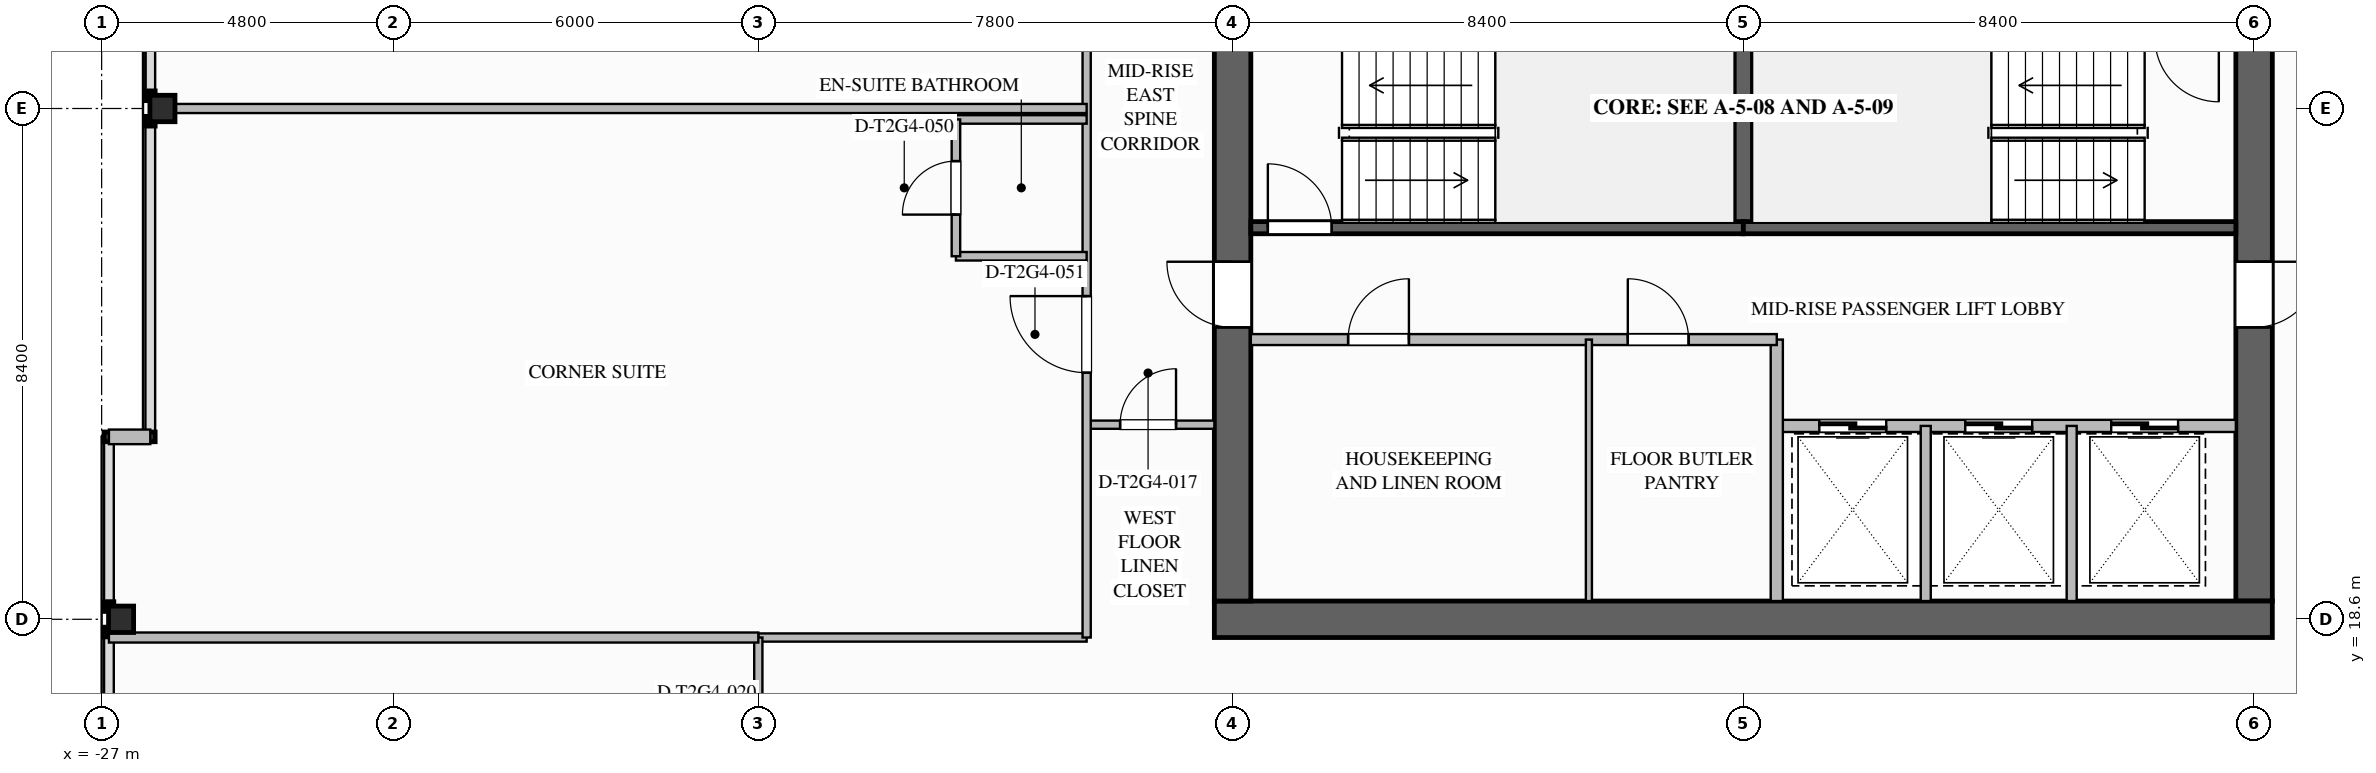
"""IFC4 building model, lengths in metres.
Left out: names, types, materials, properties, quantities, classifications, styles, units other than length and angle.
Written with IfcOpenShell. Run it as: python <this file> out.ifc"""

import sys

from ifc_helpers import new_model, si_unit, direction, frame, frame_2d, origin, origin_2d, place, context, subcontext, project, spatial, rectangle, i_section, extrude, element, fill, save


model = new_model("IFC4")
c1 = context("Model", 3, precision=1e-05, world=origin(), true_north=direction((0.0, 1.0)))
c2 = subcontext(c1, "Body", "Model", "MODEL_VIEW")
j1 = project(units=[si_unit("LENGTHUNIT", "METRE"), si_unit("PLANEANGLEUNIT", "RADIAN")], contexts=[c1])
p1 = place(None, origin())
s1 = spatial("IfcSite", under=j1, at=p1, CompositionType="ELEMENT")
p2 = place(p1, origin())
s2 = spatial("IfcBuilding", under=s1, at=p2, CompositionType="ELEMENT")
p3 = place(p2, frame((0.0, 0.0, 123.3)))
s3 = spatial("IfcBuildingStorey", under=s2, at=p3, CompositionType="ELEMENT", Elevation=123.3)
p4 = place(p3, frame((8.4, 35.1, 0.0), z_axis=(0.0, 0.0, 1.0), x_axis=(0.0, -1.0, 0.0)))
e1 = element("IfcWall", 1, at=p4, inside=s3, PredefinedType="SHEAR", context=c2, shape_type="SweptSolid", body=[
    extrude(rectangle(XDim=16.2, YDim=0.6, at=frame_2d((8.1, 0.0))), origin(), (0.0, 0.0, 1.0), 3.5),
])
p5 = place(p4, frame((3.08, 0.0, 0.0)))
e2 = element("IfcOpeningElement", 2, at=p5, cuts=e1, PredefinedType="OPENING", context=c2, shape_type="SweptSolid", body=[
    extrude(rectangle(XDim=1.12, YDim=2.1, at=frame_2d((0.56, 1.05))), frame((0.0, 0.31, 0.0), z_axis=(0.0, -1.0, 0.0), x_axis=(1.0, 0.0, 0.0)), (0.0, 0.0, 1.0), 0.62),
])
p6 = place(p4, frame((10.62, 0.0, 0.0)))
e3 = element("IfcOpeningElement", 3, at=p6, cuts=e1, PredefinedType="OPENING", context=c2, shape_type="SweptSolid", body=[
    extrude(rectangle(XDim=1.08, YDim=2.04, at=frame_2d((0.54, 1.02))), frame((0.0, 0.31, 0.0), z_axis=(0.0, -1.0, 0.0), x_axis=(1.0, 0.0, 0.0)), (0.0, 0.0, 1.0), 0.62),
])
p7 = place(p3, frame((8.7, 18.6, 0.0), z_axis=(0.0, 0.0, 1.0), x_axis=(-1.0, 0.0, 0.0)))
e4 = element("IfcWall", 4, at=p7, inside=s3, PredefinedType="SHEAR", context=c2, shape_type="SweptSolid", body=[
    extrude(rectangle(XDim=17.4, YDim=0.6, at=frame_2d((8.7, 0.0))), origin(), (0.0, 0.0, 1.0), 3.5),
])
p8 = place(p3, frame((-8.4, 18.9, 0.0), z_axis=(0.0, 0.0, 1.0), x_axis=(0.0, 1.0, 0.0)))
e5 = element("IfcWall", 5, at=p8, inside=s3, PredefinedType="SHEAR", context=c2, shape_type="SweptSolid", body=[
    extrude(rectangle(XDim=16.2, YDim=0.6, at=frame_2d((8.1, 0.0))), origin(), (0.0, 0.0, 1.0), 3.5),
])
p9 = place(p8, frame((4.5, 0.0, 0.0)))
e6 = element("IfcOpeningElement", 6, at=p9, cuts=e5, PredefinedType="OPENING", context=c2, shape_type="SweptSolid", body=[
    extrude(rectangle(XDim=1.08, YDim=2.04, at=frame_2d((0.54, 1.02))), frame((0.0, 0.31, 0.0), z_axis=(0.0, -1.0, 0.0), x_axis=(1.0, 0.0, 0.0)), (0.0, 0.0, 1.0), 0.62),
])
for number, where, z_axis, x_axis in (
    (7, (-26.68, 18.6, 0.0), (0.0, 0.0, 1.0), (1.0, 0.0, 0.0)),
    (8, (-26.0, 27.0, 0.0), (0.0, 0.0, 1.0), (1.0, 0.0, 0.0)),
):
    element("IfcColumn", number, at=place(p3, frame(where, z_axis=z_axis, x_axis=x_axis)), inside=s3, PredefinedType="COLUMN", context=c2, shape_type="SweptSolid", body=[
        extrude(i_section(OverallWidth=0.412, OverallDepth=0.435, WebThickness=0.036, FlangeThickness=0.057, FilletRadius=0.028, at=origin_2d()), origin(), (0.0, 0.0, 1.0), 3.497),
    ])
p10 = place(p3, frame((-26.88, 21.6, 0.0), z_axis=(0.0, 0.0, 1.0), x_axis=(1.0, 0.0, 0.0)))
e9 = element("IfcWall", 9, at=p10, inside=s3, PredefinedType="STANDARD", context=c2, shape_type="SweptSolid", body=[
    extrude(rectangle(XDim=0.68, YDim=0.24, at=frame_2d((0.34, 0.0))), origin(), (0.0, 0.0, 1.0), 3.24),
])
p11 = place(p3, frame((0.0, 25.04, 0.0), z_axis=(0.0, 0.0, 1.0), x_axis=(0.0, 1.0, 0.0)))
e10 = element("IfcWall", 10, at=p11, inside=s3, PredefinedType="SOLIDWALL", context=c2, shape_type="SweptSolid", body=[
    extrude(rectangle(XDim=3.12, YDim=0.3, at=frame_2d((1.56, 0.0))), origin(), (0.0, 0.0, 1.0), 3.24),
])
p12 = place(p3, frame((-8.1, 25.04, 0.0), z_axis=(0.0, 0.0, 1.0), x_axis=(1.0, 0.0, 0.0)))
e11 = element("IfcWall", 11, at=p12, inside=s3, PredefinedType="SOLIDWALL", context=c2, shape_type="SweptSolid", body=[
    extrude(rectangle(XDim=8.1, YDim=0.2, at=frame_2d((4.05, 0.0))), origin(), (0.0, 0.0, 1.0), 3.24),
])
p13 = place(p12, frame((0.28, 0.0, 0.0)))
e12 = element("IfcOpeningElement", 12, at=p13, cuts=e11, PredefinedType="OPENING", context=c2, shape_type="SweptSolid", body=[
    extrude(rectangle(XDim=1.05, YDim=2.1, at=frame_2d((0.525, 1.05))), frame((0.0, 0.11, 0.0), z_axis=(0.0, -1.0, 0.0), x_axis=(1.0, 0.0, 0.0)), (0.0, 0.0, 1.0), 0.22),
])
p14 = place(p3, frame((0.0, 25.04, 0.0), z_axis=(0.0, 0.0, 1.0), x_axis=(1.0, 0.0, 0.0)))
e13 = element("IfcWall", 13, at=p14, inside=s3, PredefinedType="SOLIDWALL", context=c2, shape_type="SweptSolid", body=[
    extrude(rectangle(XDim=8.1, YDim=0.2, at=frame_2d((4.05, 0.0))), origin(), (0.0, 0.0, 1.0), 3.24),
])
p15 = place(p3, frame((8.1, 21.78, 0.0), z_axis=(0.0, 0.0, 1.0), x_axis=(-1.0, 0.0, 0.0)))
e14 = element("IfcWall", 14, at=p15, inside=s3, PredefinedType="SOLIDWALL", context=c2, shape_type="SweptSolid", body=[
    extrude(rectangle(XDim=7.55, YDim=0.2, at=frame_2d((3.775, 0.0))), origin(), (0.0, 0.0, 1.0), 3.24),
])
p16 = place(p15, frame((5.75, 0.0, 0.0)))
e15 = element("IfcOpeningElement", 15, at=p16, cuts=e14, PredefinedType="OPENING", context=c2, shape_type="SweptSolid", body=[
    extrude(rectangle(XDim=1.1, YDim=2.2, at=frame_2d((0.55, 1.1))), frame((0.0, 0.11, 0.0), z_axis=(0.0, -1.0, 0.0), x_axis=(1.0, 0.0, 0.0)), (0.0, 0.0, 1.0), 0.22),
])
p17 = place(p15, frame((3.35, 0.0, 0.0)))
e16 = element("IfcOpeningElement", 16, at=p17, cuts=e14, PredefinedType="OPENING", context=c2, shape_type="SweptSolid", body=[
    extrude(rectangle(XDim=1.1, YDim=2.2, at=frame_2d((0.55, 1.1))), frame((0.0, 0.11, 0.0), z_axis=(0.0, -1.0, 0.0), x_axis=(1.0, 0.0, 0.0)), (0.0, 0.0, 1.0), 0.22),
])
p18 = place(p15, frame((0.95, 0.0, 0.0)))
e17 = element("IfcOpeningElement", 17, at=p18, cuts=e14, PredefinedType="OPENING", context=c2, shape_type="SweptSolid", body=[
    extrude(rectangle(XDim=1.1, YDim=2.2, at=frame_2d((0.55, 1.1))), frame((0.0, 0.11, 0.0), z_axis=(0.0, -1.0, 0.0), x_axis=(1.0, 0.0, 0.0)), (0.0, 0.0, 1.0), 0.22),
])
p19 = place(p3, frame((0.55, 18.9, 0.0), z_axis=(0.0, 0.0, 1.0), x_axis=(0.0, 1.0, 0.0)))
e18 = element("IfcWall", 18, at=p19, inside=s3, PredefinedType="SOLIDWALL", context=c2, shape_type="SweptSolid", body=[
    extrude(rectangle(XDim=4.3, YDim=0.2, at=frame_2d((2.15, 0.0))), origin(), (0.0, 0.0, 1.0), 3.24),
])
for number, where, z_axis, x_axis in (
    (19, (3.0, 18.9, 0.0), (0.0, 0.0, 1.0), (0.0, 1.0, 0.0)),
    (20, (5.4, 18.9, 0.0), (0.0, 0.0, 1.0), (0.0, 1.0, 0.0)),
):
    element("IfcWall", number, at=place(p3, frame(where, z_axis=z_axis, x_axis=x_axis)), inside=s3, PredefinedType="PARTITIONING", context=c2, shape_type="SweptSolid", body=[
        extrude(rectangle(XDim=2.88, YDim=0.165, at=frame_2d((1.44, 0.0))), origin(), (0.0, 0.0, 1.0), 3.24),
    ])
p20 = place(p3, frame((-8.1, 23.2, 0.0), z_axis=(0.0, 0.0, 1.0), x_axis=(1.0, 0.0, 0.0)))
e21 = element("IfcWall", 21, at=p20, inside=s3, PredefinedType="SOLIDWALL", context=c2, shape_type="SweptSolid", body=[
    extrude(rectangle(XDim=8.65, YDim=0.18, at=frame_2d((4.325, 0.0))), origin(), (0.0, 0.0, 1.0), 3.24),
])
p21 = place(p20, frame((1.6, 0.0, 0.0)))
e22 = element("IfcOpeningElement", 22, at=p21, cuts=e21, PredefinedType="OPENING", context=c2, shape_type="SweptSolid", body=[
    extrude(rectangle(XDim=1.0, YDim=2.1, at=frame_2d((0.5, 1.05))), frame((0.0, 0.1, 0.0), z_axis=(0.0, -1.0, 0.0), x_axis=(1.0, 0.0, 0.0)), (0.0, 0.0, 1.0), 0.2),
])
p22 = place(p20, frame((6.2, 0.0, 0.0)))
e23 = element("IfcOpeningElement", 23, at=p22, cuts=e21, PredefinedType="OPENING", context=c2, shape_type="SweptSolid", body=[
    extrude(rectangle(XDim=1.0, YDim=2.1, at=frame_2d((0.5, 1.05))), frame((0.0, 0.1, 0.0), z_axis=(0.0, -1.0, 0.0), x_axis=(1.0, 0.0, 0.0)), (0.0, 0.0, 1.0), 0.2),
])
p23 = place(p3, frame((-2.54, 18.9, 0.0), z_axis=(0.0, 0.0, 1.0), x_axis=(0.0, 1.0, 0.0)))
e24 = element("IfcWall", 24, at=p23, inside=s3, PredefinedType="PARTITIONING", context=c2, shape_type="SweptSolid", body=[
    extrude(rectangle(XDim=4.3, YDim=0.1, at=frame_2d((2.15, 0.0))), origin(), (0.0, 0.0, 1.0), 3.24),
])
p24 = place(p3, frame((-10.8, 21.8, 0.0), z_axis=(0.0, 0.0, 1.0), x_axis=(1.0, 0.0, 0.0)))
e25 = element("IfcWall", 25, at=p24, inside=s3, PredefinedType="PARTITIONING", context=c2, shape_type="SweptSolid", body=[
    extrude(rectangle(XDim=2.1, YDim=0.135, at=frame_2d((1.05, 0.0))), origin(), (0.0, 0.0, 1.0), 3.24),
])
p25 = place(p24, frame((0.55, 0.0, 0.0)))
e26 = element("IfcOpeningElement", 26, at=p25, cuts=e25, PredefinedType="OPENING", context=c2, shape_type="SweptSolid", body=[
    extrude(rectangle(XDim=0.92, YDim=2.1, at=frame_2d((0.46, 1.05))), frame((0.0, 0.077, 0.0), z_axis=(0.0, -1.0, 0.0), x_axis=(1.0, 0.0, 0.0)), (0.0, 0.0, 1.0), 0.155),
])
p26 = place(p3, frame((-16.2, 18.3, 0.0), z_axis=(0.0, 0.0, 1.0), x_axis=(1.0, 0.0, 0.0)))
e27 = element("IfcWall", 27, at=p26, inside=s3, PredefinedType="PARTITIONING", context=c2, shape_type="SweptSolid", body=[
    extrude(rectangle(XDim=5.4, YDim=0.135, at=frame_2d((2.7, 0.0))), origin(), (0.0, 0.0, 1.0), 3.24),
])
p27 = place(p3, frame((-10.8, 18.3, 0.0), z_axis=(0.0, 0.0, 1.0), x_axis=(0.0, 1.0, 0.0)))
e28 = element("IfcWall", 28, at=p27, inside=s3, PredefinedType="PARTITIONING", context=c2, shape_type="SweptSolid", body=[
    extrude(rectangle(XDim=17.4, YDim=0.135, at=frame_2d((8.7, 0.0))), origin(), (0.0, 0.0, 1.0), 3.24),
])
p28 = place(p27, frame((4.355, 0.0, 0.0)))
e29 = element("IfcOpeningElement", 29, at=p28, cuts=e28, PredefinedType="OPENING", context=c2, shape_type="SweptSolid", body=[
    extrude(rectangle(XDim=1.26, YDim=2.2, at=frame_2d((0.63, 1.1))), frame((0.0, 0.077, 0.0), z_axis=(0.0, -1.0, 0.0), x_axis=(1.0, 0.0, 0.0)), (0.0, 0.0, 1.0), 0.155),
])
p29 = place(p27, frame((10.69, 0.0, 0.0)))
e30 = element("IfcOpeningElement", 30, at=p29, cuts=e28, PredefinedType="OPENING", context=c2, shape_type="SweptSolid", body=[
    extrude(rectangle(XDim=1.02, YDim=2.15, at=frame_2d((0.51, 1.075))), frame((0.0, 0.077, 0.0), z_axis=(0.0, -1.0, 0.0), x_axis=(1.0, 0.0, 0.0)), (0.0, 0.0, 1.0), 0.155),
])
p30 = place(p3, frame((-16.2, 15.35, 0.0), z_axis=(0.0, 0.0, 1.0), x_axis=(0.0, 1.0, 0.0)))
e31 = element("IfcWall", 31, at=p30, inside=s3, PredefinedType="PARTITIONING", context=c2, shape_type="SweptSolid", body=[
    extrude(rectangle(XDim=2.95, YDim=0.135, at=frame_2d((1.475, 0.0))), origin(), (0.0, 0.0, 1.0), 2.53),
])
p31 = place(p30, frame((0.52, 0.0, 0.0)))
e32 = element("IfcOpeningElement", 32, at=p31, cuts=e31, PredefinedType="OPENING", context=c2, shape_type="SweptSolid", body=[
    extrude(rectangle(XDim=1.02, YDim=2.15, at=frame_2d((0.51, 1.075))), frame((0.0, 0.077, 0.0), z_axis=(0.0, -1.0, 0.0), x_axis=(1.0, 0.0, 0.0)), (0.0, 0.0, 1.0), 0.155),
])
p32 = place(p3, frame((-26.88, 18.3, 0.0), z_axis=(0.0, 0.0, 1.0), x_axis=(1.0, 0.0, 0.0)))
e33 = element("IfcWall", 33, at=p32, inside=s3, PredefinedType="PARTITIONING", context=c2, shape_type="SweptSolid", body=[
    extrude(rectangle(XDim=10.68, YDim=0.165, at=frame_2d((5.34, 0.0))), origin(), (0.0, 0.0, 1.0), 2.53),
])
p33 = place(p3, frame((-26.2, 27.0, 0.0), z_axis=(0.0, 0.0, 1.0), x_axis=(1.0, 0.0, 0.0)))
e34 = element("IfcWall", 34, at=p33, inside=s3, PredefinedType="PARTITIONING", context=c2, shape_type="SweptSolid", body=[
    extrude(rectangle(XDim=15.4, YDim=0.15, at=frame_2d((7.7, 0.0))), origin(), (0.0, 0.0, 1.0), 2.53),
])
p34 = place(p3, frame((-10.8, 24.57, 0.0), z_axis=(0.0, 0.0, 1.0), x_axis=(-1.0, 0.0, 0.0)))
e35 = element("IfcWall", 35, at=p34, inside=s3, PredefinedType="PLUMBINGWALL", context=c2, shape_type="SweptSolid", body=[
    extrude(rectangle(XDim=2.15, YDim=0.14, at=frame_2d((1.075, 0.0))), origin(), (0.0, 0.0, 1.0), 3.24),
])
p35 = place(p3, frame((-10.8, 26.82, 0.0), z_axis=(0.0, 0.0, 1.0), x_axis=(-1.0, 0.0, 0.0)))
e36 = element("IfcWall", 36, at=p35, inside=s3, PredefinedType="PLUMBINGWALL", context=c2, shape_type="SweptSolid", body=[
    extrude(rectangle(XDim=2.15, YDim=0.14, at=frame_2d((1.075, 0.0))), origin(), (0.0, 0.0, 1.0), 2.617),
])
p36 = place(p3, frame((-12.95, 24.57, 0.0), z_axis=(0.0, 0.0, 1.0), x_axis=(0.0, 1.0, 0.0)))
e37 = element("IfcWall", 37, at=p36, inside=s3, PredefinedType="PLUMBINGWALL", context=c2, shape_type="SweptSolid", body=[
    extrude(rectangle(XDim=2.25, YDim=0.14, at=frame_2d((1.125, 0.0))), origin(), (0.0, 0.0, 1.0), 3.24),
])
p37 = place(p36, frame((0.685, 0.0, 0.0)))
e38 = element("IfcOpeningElement", 38, at=p37, cuts=e37, PredefinedType="OPENING", context=c2, shape_type="SweptSolid", body=[
    extrude(rectangle(XDim=0.88, YDim=2.1, at=frame_2d((0.44, 1.05))), frame((0.0, 0.08, 0.0), z_axis=(0.0, -1.0, 0.0), x_axis=(1.0, 0.0, 0.0)), (0.0, 0.0, 1.0), 0.16),
])
p38 = place(p13, origin())
e39 = element("IfcDoor", 39, at=p38, inside=s3, OperationType="SINGLE_SWING_LEFT", PredefinedType="DOOR", context=c2, shape_type="SweptSolid", body=[
    extrude(rectangle(XDim=1.05, YDim=2.1, at=frame_2d((0.525, 1.05))), frame((0.0, 0.025, 0.0), z_axis=(0.0, -1.0, 0.0), x_axis=(1.0, 0.0, 0.0)), (0.0, 0.0, 1.0), 0.05),
])
fill(e12, e39)
p39 = place(p16, origin())
e40 = element("IfcDoor", 40, at=p39, inside=s3, OperationType="SLIDING_TO_LEFT", PredefinedType="DOOR", context=c2, shape_type="SweptSolid", body=[
    extrude(rectangle(XDim=1.1, YDim=2.2, at=frame_2d((0.55, 1.1))), frame((0.0, 0.025, 0.0), z_axis=(0.0, -1.0, 0.0), x_axis=(1.0, 0.0, 0.0)), (0.0, 0.0, 1.0), 0.05),
])
fill(e15, e40)
p40 = place(p17, origin())
e41 = element("IfcDoor", 41, at=p40, inside=s3, OperationType="SLIDING_TO_LEFT", PredefinedType="DOOR", context=c2, shape_type="SweptSolid", body=[
    extrude(rectangle(XDim=1.1, YDim=2.2, at=frame_2d((0.55, 1.1))), frame((0.0, 0.025, 0.0), z_axis=(0.0, -1.0, 0.0), x_axis=(1.0, 0.0, 0.0)), (0.0, 0.0, 1.0), 0.05),
])
fill(e16, e41)
p41 = place(p18, origin())
e42 = element("IfcDoor", 42, at=p41, inside=s3, OperationType="SLIDING_TO_LEFT", PredefinedType="DOOR", context=c2, shape_type="SweptSolid", body=[
    extrude(rectangle(XDim=1.1, YDim=2.2, at=frame_2d((0.55, 1.1))), frame((0.0, 0.025, 0.0), z_axis=(0.0, -1.0, 0.0), x_axis=(1.0, 0.0, 0.0)), (0.0, 0.0, 1.0), 0.05),
])
fill(e17, e42)
p42 = place(p9, origin())
e43 = element("IfcDoor", 43, at=p42, inside=s3, OperationType="SINGLE_SWING_RIGHT", PredefinedType="DOOR", context=c2, shape_type="SweptSolid", body=[
    extrude(rectangle(XDim=1.08, YDim=2.04, at=frame_2d((0.54, 1.02))), frame((0.0, 0.025, 0.0), z_axis=(0.0, -1.0, 0.0), x_axis=(1.0, 0.0, 0.0)), (0.0, 0.0, 1.0), 0.05),
])
fill(e6, e43)
p43 = place(p6, origin())
e44 = element("IfcDoor", 44, at=p43, inside=s3, OperationType="SINGLE_SWING_LEFT", PredefinedType="DOOR", context=c2, shape_type="SweptSolid", body=[
    extrude(rectangle(XDim=1.08, YDim=2.04, at=frame_2d((0.54, 1.02))), frame((0.0, 0.025, 0.0), z_axis=(0.0, -1.0, 0.0), x_axis=(1.0, 0.0, 0.0)), (0.0, 0.0, 1.0), 0.05),
])
fill(e3, e44)
p44 = place(p21, origin())
e45 = element("IfcDoor", 45, at=p44, inside=s3, OperationType="SINGLE_SWING_RIGHT", PredefinedType="DOOR", context=c2, shape_type="SweptSolid", body=[
    extrude(rectangle(XDim=1.0, YDim=2.1, at=frame_2d((0.5, 1.05))), frame((0.0, 0.025, 0.0), z_axis=(0.0, -1.0, 0.0), x_axis=(1.0, 0.0, 0.0)), (0.0, 0.0, 1.0), 0.05),
])
fill(e22, e45)
p45 = place(p22, origin())
e46 = element("IfcDoor", 46, at=p45, inside=s3, OperationType="SINGLE_SWING_LEFT", PredefinedType="DOOR", context=c2, shape_type="SweptSolid", body=[
    extrude(rectangle(XDim=1.0, YDim=2.1, at=frame_2d((0.5, 1.05))), frame((0.0, 0.025, 0.0), z_axis=(0.0, -1.0, 0.0), x_axis=(1.0, 0.0, 0.0)), (0.0, 0.0, 1.0), 0.05),
])
fill(e23, e46)
p46 = place(p25, origin())
e47 = element("IfcDoor", 47, at=p46, inside=s3, OperationType="SINGLE_SWING_RIGHT", PredefinedType="DOOR", context=c2, shape_type="SweptSolid", body=[
    extrude(rectangle(XDim=0.92, YDim=2.1, at=frame_2d((0.46, 1.05))), frame((0.0, 0.025, 0.0), z_axis=(0.0, -1.0, 0.0), x_axis=(1.0, 0.0, 0.0)), (0.0, 0.0, 1.0), 0.05),
])
fill(e26, e47)
p47 = place(p37, origin())
e48 = element("IfcDoor", 48, at=p47, inside=s3, OperationType="SINGLE_SWING_LEFT", PredefinedType="DOOR", context=c2, shape_type="SweptSolid", body=[
    extrude(rectangle(XDim=0.88, YDim=2.1, at=frame_2d((0.44, 1.05))), frame((0.0, 0.025, 0.0), z_axis=(0.0, -1.0, 0.0), x_axis=(1.0, 0.0, 0.0)), (0.0, 0.0, 1.0), 0.05),
])
fill(e38, e48)
p48 = place(p28, origin())
e49 = element("IfcDoor", 49, at=p48, inside=s3, OperationType="SINGLE_SWING_RIGHT", PredefinedType="DOOR", context=c2, shape_type="SweptSolid", body=[
    extrude(rectangle(XDim=1.26, YDim=2.2, at=frame_2d((0.63, 1.1))), frame((0.0, 0.025, 0.0), z_axis=(0.0, -1.0, 0.0), x_axis=(1.0, 0.0, 0.0)), (0.0, 0.0, 1.0), 0.05),
])
fill(e29, e49)
save(model, sys.argv[1])
